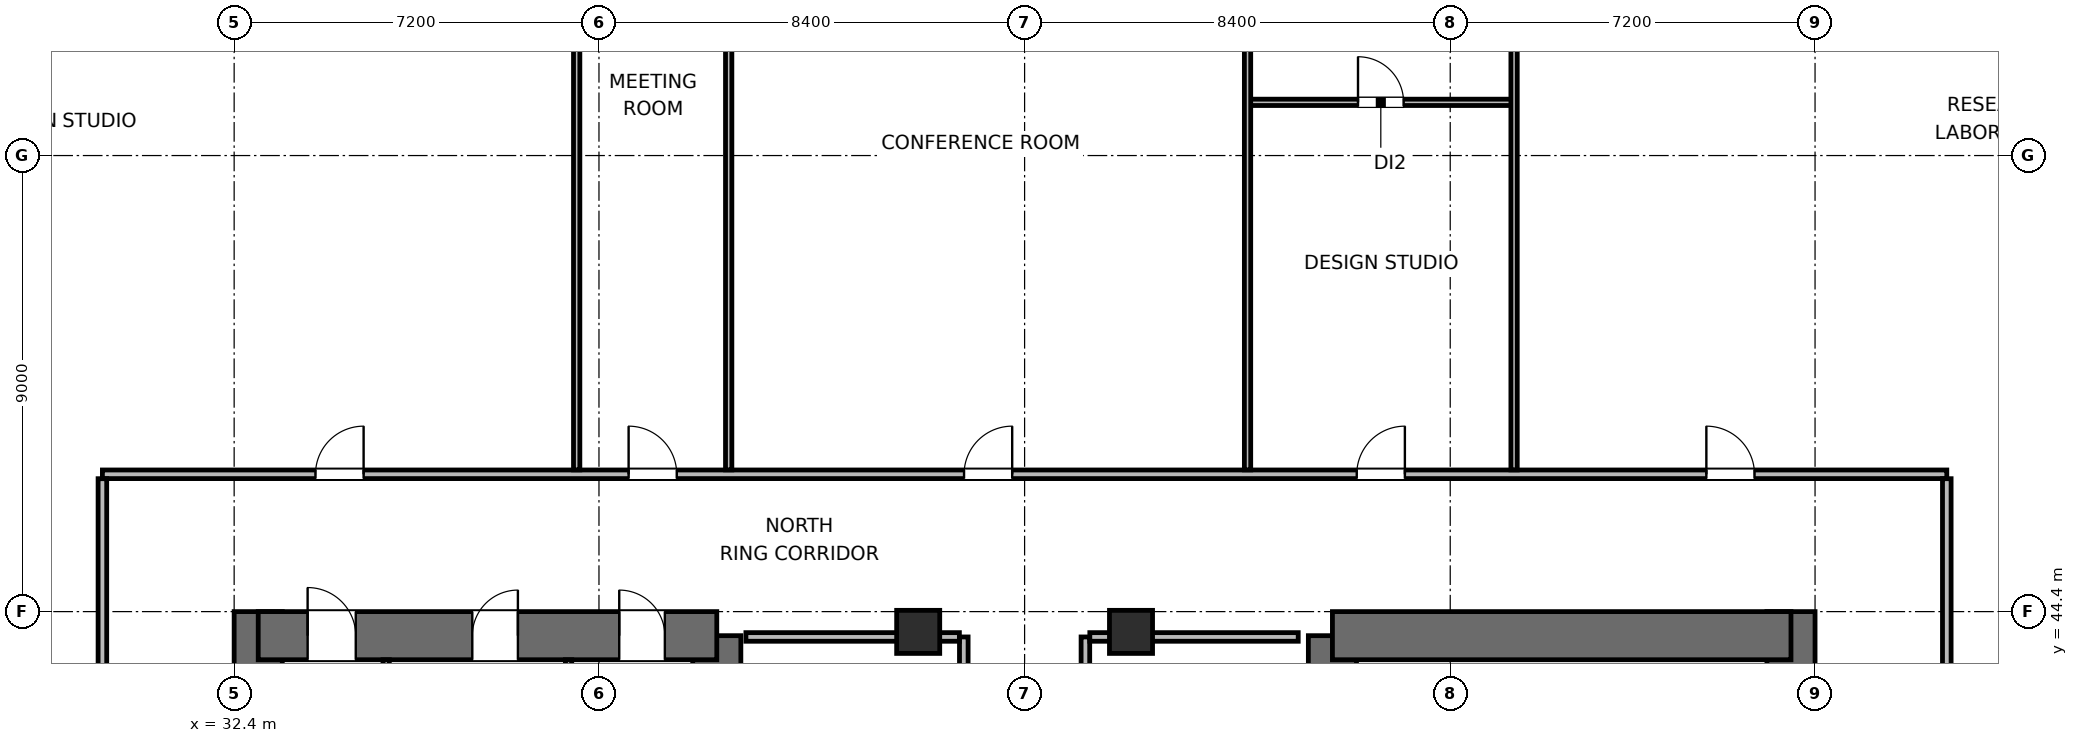
"""IFC4 building model, lengths in metres.
Left out: names, types, materials, properties, quantities, classifications, styles, units other than length and angle.
Written with IfcOpenShell. Run it as: python <this file> out.ifc"""

import sys

from ifc_helpers import new_model, si_unit, direction, frame, frame_2d, origin, origin_2d, place, context, subcontext, project, spatial, rectangle, extrude, element, fill, save


model = new_model("IFC4")
c1 = context("Model", 3, precision=1e-05, world=origin(), true_north=direction((0.0, 1.0)))
c2 = subcontext(c1, "Body", "Model", "MODEL_VIEW")
j1 = project(units=[si_unit("LENGTHUNIT", "METRE"), si_unit("PLANEANGLEUNIT", "RADIAN")], contexts=[c1])
p1 = place(None, origin())
s1 = spatial("IfcSite", under=j1, at=p1, CompositionType="ELEMENT")
p2 = place(p1, origin())
s2 = spatial("IfcBuilding", under=s1, at=p2, CompositionType="ELEMENT")
p3 = place(p2, frame((0.0, 0.0, 52.8)))
s3 = spatial("IfcBuildingStorey", under=s2, at=p3, CompositionType="ELEMENT", Elevation=52.8)
p4 = place(p3, frame((32.875, 27.6, 0.0), z_axis=(0.0, 0.0, 1.0), x_axis=(0.0, 1.0, 0.0)))
e1 = element("IfcWall", 1, at=p4, inside=s3, PredefinedType="SHEAR", context=c2, shape_type="SweptSolid", body=[
    extrude(rectangle(XDim=16.8, YDim=0.95, at=frame_2d((8.4, 0.0))), origin(), (0.0, 0.0, 1.0), 3.9),
])
p5 = place(p3, frame((41.925, 37.8, 0.0), z_axis=(0.0, 0.0, 1.0), x_axis=(0.0, 1.0, 0.0)))
e2 = element("IfcWall", 2, at=p5, inside=s3, PredefinedType="SHEAR", context=c2, shape_type="SweptSolid", body=[
    extrude(rectangle(XDim=6.125, YDim=0.95, at=frame_2d((3.062, 0.0))), origin(), (0.0, 0.0, 1.0), 3.9),
])
p6 = place(p3, frame((32.875, 43.925, 0.0), z_axis=(0.0, 0.0, 1.0), x_axis=(1.0, 0.0, 0.0)))
e3 = element("IfcWall", 3, at=p6, inside=s3, PredefinedType="SHEAR", context=c2, shape_type="SweptSolid", body=[
    extrude(rectangle(XDim=9.05, YDim=0.95, at=frame_2d((4.525, 0.0))), origin(), (0.0, 0.0, 1.0), 3.9),
])
p7 = place(p6, frame((0.975, 0.0, 0.0)))
e4 = element("IfcOpeningElement", 4, at=p7, cuts=e3, PredefinedType="OPENING", context=c2, shape_type="SweptSolid", body=[
    extrude(rectangle(XDim=0.95, YDim=2.04, at=frame_2d((0.475, 1.02))), frame((0.0, 0.485, 0.0), z_axis=(0.0, -1.0, 0.0), x_axis=(1.0, 0.0, 0.0)), (0.0, 0.0, 1.0), 0.97),
])
p8 = place(p6, frame((4.225, 0.0, 0.0)))
e5 = element("IfcOpeningElement", 5, at=p8, cuts=e3, PredefinedType="OPENING", context=c2, shape_type="SweptSolid", body=[
    extrude(rectangle(XDim=0.9, YDim=2.02, at=frame_2d((0.45, 1.01))), frame((0.0, 0.485, 0.0), z_axis=(0.0, -1.0, 0.0), x_axis=(1.0, 0.0, 0.0)), (0.0, 0.0, 1.0), 0.97),
])
p9 = place(p6, frame((7.125, 0.0, 0.0)))
e6 = element("IfcOpeningElement", 6, at=p9, cuts=e3, PredefinedType="OPENING", context=c2, shape_type="SweptSolid", body=[
    extrude(rectangle(XDim=0.9, YDim=2.02, at=frame_2d((0.45, 1.01))), frame((0.0, 0.485, 0.0), z_axis=(0.0, -1.0, 0.0), x_axis=(1.0, 0.0, 0.0)), (0.0, 0.0, 1.0), 0.97),
])
p10 = place(p3, frame((54.075, 38.0, 0.0), z_axis=(0.0, 0.0, 1.0), x_axis=(0.0, 1.0, 0.0)))
e7 = element("IfcWall", 7, at=p10, inside=s3, PredefinedType="SHEAR", context=c2, shape_type="SweptSolid", body=[
    extrude(rectangle(XDim=5.925, YDim=0.95, at=frame_2d((2.962, 0.0))), origin(), (0.0, 0.0, 1.0), 3.9),
])
p11 = place(p3, frame((63.125, 27.6, 0.0), z_axis=(0.0, 0.0, 1.0), x_axis=(0.0, 1.0, 0.0)))
e8 = element("IfcWall", 8, at=p11, inside=s3, PredefinedType="SHEAR", context=c2, shape_type="SweptSolid", body=[
    extrude(rectangle(XDim=16.8, YDim=0.95, at=frame_2d((8.4, 0.0))), origin(), (0.0, 0.0, 1.0), 3.9),
])
p12 = place(p3, frame((54.075, 43.925, 0.0), z_axis=(0.0, 0.0, 1.0), x_axis=(1.0, 0.0, 0.0)))
e9 = element("IfcWall", 9, at=p12, inside=s3, PredefinedType="SHEAR", context=c2, shape_type="SweptSolid", body=[
    extrude(rectangle(XDim=9.05, YDim=0.95, at=frame_2d((4.525, 0.0))), origin(), (0.0, 0.0, 1.0), 3.9),
])
for number, where, z_axis, x_axis in (
    (10, (45.9, 44.0, 0.0), (0.0, 0.0, 1.0), (1.0, 0.0, 0.0)),
    (11, (50.1, 44.0, 0.0), (0.0, 0.0, 1.0), (1.0, 0.0, 0.0)),
):
    element("IfcColumn", number, at=place(p3, frame(where, z_axis=z_axis, x_axis=x_axis)), inside=s3, PredefinedType="COLUMN", context=c2, shape_type="SweptSolid", body=[
        extrude(rectangle(XDim=0.85, YDim=0.85, at=origin_2d()), origin(), (0.0, 0.0, 1.0), 3.9),
    ])
for number, where, z_axis, x_axis in (
    (12, (35.4, 41.095, 0.0), (0.0, 0.0, 1.0), (0.0, 1.0, 0.0)),
    (13, (39.0, 41.095, 0.0), (0.0, 0.0, 1.0), (0.0, 1.0, 0.0)),
):
    element("IfcWall", number, at=place(p3, frame(where, z_axis=z_axis, x_axis=x_axis)), inside=s3, PredefinedType="PARTITIONING", context=c2, shape_type="SweptSolid", body=[
        extrude(rectangle(XDim=2.355, YDim=0.125, at=frame_2d((1.177, 0.0))), origin(), (0.0, 0.0, 1.0), 3.64),
    ])
p13 = place(p3, frame((46.8, 37.9, 0.0), z_axis=(0.0, 0.0, 1.0), x_axis=(0.0, 1.0, 0.0)))
e14 = element("IfcWall", 14, at=p13, inside=s3, PredefinedType="PARTITIONING", context=c2, shape_type="SweptSolid", body=[
    extrude(rectangle(XDim=6.0, YDim=0.17, at=frame_2d((3.0, 0.0))), origin(), (0.0, 0.0, 1.0), 3.64),
])
p14 = place(p13, frame((2.55, 0.0, 0.0)))
e15 = element("IfcOpeningElement", 15, at=p14, cuts=e14, PredefinedType="OPENING", context=c2, shape_type="SweptSolid", body=[
    extrude(rectangle(XDim=0.9, YDim=2.02, at=frame_2d((0.45, 1.01))), frame((0.0, 0.095, 0.0), z_axis=(0.0, -1.0, 0.0), x_axis=(1.0, 0.0, 0.0)), (0.0, 0.0, 1.0), 0.19),
])
p15 = place(p3, frame((42.5, 43.9, 0.0), z_axis=(0.0, 0.0, 1.0), x_axis=(1.0, 0.0, 0.0)))
e16 = element("IfcWall", 16, at=p15, inside=s3, PredefinedType="PARTITIONING", context=c2, shape_type="SweptSolid", body=[
    extrude(rectangle(XDim=4.213, YDim=0.17, at=frame_2d((2.106, 0.0))), origin(), (0.0, 0.0, 1.0), 2.525),
])
p16 = place(p3, frame((49.2, 37.9, 0.0), z_axis=(0.0, 0.0, 1.0), x_axis=(0.0, 1.0, 0.0)))
e17 = element("IfcWall", 17, at=p16, inside=s3, PredefinedType="PARTITIONING", context=c2, shape_type="SweptSolid", body=[
    extrude(rectangle(XDim=6.0, YDim=0.17, at=frame_2d((3.0, 0.0))), origin(), (0.0, 0.0, 1.0), 3.64),
])
p17 = place(p16, frame((1.47, 0.0, 0.0)))
e18 = element("IfcOpeningElement", 18, at=p17, cuts=e17, PredefinedType="OPENING", context=c2, shape_type="SweptSolid", body=[
    extrude(rectangle(XDim=0.9, YDim=2.02, at=frame_2d((0.45, 1.01))), frame((0.0, 0.095, 0.0), z_axis=(0.0, -1.0, 0.0), x_axis=(1.0, 0.0, 0.0)), (0.0, 0.0, 1.0), 0.19),
])
p18 = place(p16, frame((4.47, 0.0, 0.0)))
e19 = element("IfcOpeningElement", 19, at=p18, cuts=e17, PredefinedType="OPENING", context=c2, shape_type="SweptSolid", body=[
    extrude(rectangle(XDim=0.9, YDim=2.02, at=frame_2d((0.45, 1.01))), frame((0.0, 0.095, 0.0), z_axis=(0.0, -1.0, 0.0), x_axis=(1.0, 0.0, 0.0)), (0.0, 0.0, 1.0), 0.19),
])
p19 = place(p3, frame((49.287, 43.9, 0.0), z_axis=(0.0, 0.0, 1.0), x_axis=(1.0, 0.0, 0.0)))
e20 = element("IfcWall", 20, at=p19, inside=s3, PredefinedType="PARTITIONING", context=c2, shape_type="SweptSolid", body=[
    extrude(rectangle(XDim=4.113, YDim=0.17, at=frame_2d((2.056, 0.0))), origin(), (0.0, 0.0, 1.0), 2.525),
])
p20 = place(p3, frame((29.8, 47.11, 0.0), z_axis=(0.0, 0.0, 1.0), x_axis=(1.0, 0.0, 0.0)))
e21 = element("IfcWall", 21, at=p20, inside=s3, PredefinedType="PARTITIONING", context=c2, shape_type="SweptSolid", body=[
    extrude(rectangle(XDim=36.4, YDim=0.17, at=frame_2d((18.2, 0.0))), origin(), (0.0, 0.0, 1.0), 3.64),
])
p21 = place(p20, frame((4.205, 0.0, 0.0)))
e22 = element("IfcOpeningElement", 22, at=p21, cuts=e21, PredefinedType="OPENING", context=c2, shape_type="SweptSolid", body=[
    extrude(rectangle(XDim=0.95, YDim=2.04, at=frame_2d((0.475, 1.02))), frame((0.0, 0.095, 0.0), z_axis=(0.0, -1.0, 0.0), x_axis=(1.0, 0.0, 0.0)), (0.0, 0.0, 1.0), 0.19),
])
p22 = place(p20, frame((10.385, 0.0, 0.0)))
e23 = element("IfcOpeningElement", 23, at=p22, cuts=e21, PredefinedType="OPENING", context=c2, shape_type="SweptSolid", body=[
    extrude(rectangle(XDim=0.95, YDim=2.04, at=frame_2d((0.475, 1.02))), frame((0.0, 0.095, 0.0), z_axis=(0.0, -1.0, 0.0), x_axis=(1.0, 0.0, 0.0)), (0.0, 0.0, 1.0), 0.19),
])
p23 = place(p20, frame((17.005, 0.0, 0.0)))
e24 = element("IfcOpeningElement", 24, at=p23, cuts=e21, PredefinedType="OPENING", context=c2, shape_type="SweptSolid", body=[
    extrude(rectangle(XDim=0.95, YDim=2.04, at=frame_2d((0.475, 1.02))), frame((0.0, 0.095, 0.0), z_axis=(0.0, -1.0, 0.0), x_axis=(1.0, 0.0, 0.0)), (0.0, 0.0, 1.0), 0.19),
])
p24 = place(p20, frame((24.755, 0.0, 0.0)))
e25 = element("IfcOpeningElement", 25, at=p24, cuts=e21, PredefinedType="OPENING", context=c2, shape_type="SweptSolid", body=[
    extrude(rectangle(XDim=0.95, YDim=2.04, at=frame_2d((0.475, 1.02))), frame((0.0, 0.095, 0.0), z_axis=(0.0, -1.0, 0.0), x_axis=(1.0, 0.0, 0.0)), (0.0, 0.0, 1.0), 0.19),
])
p25 = place(p20, frame((31.655, 0.0, 0.0)))
e26 = element("IfcOpeningElement", 26, at=p25, cuts=e21, PredefinedType="OPENING", context=c2, shape_type="SweptSolid", body=[
    extrude(rectangle(XDim=0.95, YDim=2.04, at=frame_2d((0.475, 1.02))), frame((0.0, 0.095, 0.0), z_axis=(0.0, -1.0, 0.0), x_axis=(1.0, 0.0, 0.0)), (0.0, 0.0, 1.0), 0.19),
])
p26 = place(p3, frame((29.8, 24.977, 0.0), z_axis=(0.0, 0.0, 1.0), x_axis=(0.0, 1.0, 0.0)))
e27 = element("IfcWall", 27, at=p26, inside=s3, PredefinedType="PARTITIONING", context=c2, shape_type="SweptSolid", body=[
    extrude(rectangle(XDim=22.046, YDim=0.17, at=frame_2d((11.023, 0.0))), origin(), (0.0, 0.0, 1.0), 3.64),
])
p27 = place(p26, frame((10.548, 0.0, 0.0)))
e28 = element("IfcOpeningElement", 28, at=p27, cuts=e27, PredefinedType="OPENING", context=c2, shape_type="SweptSolid", body=[
    extrude(rectangle(XDim=0.95, YDim=2.04, at=frame_2d((0.475, 1.02))), frame((0.0, 0.095, 0.0), z_axis=(0.0, -1.0, 0.0), x_axis=(1.0, 0.0, 0.0)), (0.0, 0.0, 1.0), 0.19),
])
p28 = place(p3, frame((66.2, 24.977, 0.0), z_axis=(0.0, 0.0, 1.0), x_axis=(0.0, 1.0, 0.0)))
e29 = element("IfcWall", 29, at=p28, inside=s3, PredefinedType="PARTITIONING", context=c2, shape_type="SweptSolid", body=[
    extrude(rectangle(XDim=22.046, YDim=0.17, at=frame_2d((11.023, 0.0))), origin(), (0.0, 0.0, 1.0), 3.64),
])
p29 = place(p28, frame((4.493, 0.0, 0.0)))
e30 = element("IfcOpeningElement", 30, at=p29, cuts=e29, PredefinedType="OPENING", context=c2, shape_type="SweptSolid", body=[
    extrude(rectangle(XDim=0.95, YDim=2.04, at=frame_2d((0.475, 1.02))), frame((0.0, 0.095, 0.0), z_axis=(0.0, -1.0, 0.0), x_axis=(1.0, 0.0, 0.0)), (0.0, 0.0, 1.0), 0.19),
])
p30 = place(p28, frame((15.603, 0.0, 0.0)))
e31 = element("IfcOpeningElement", 31, at=p30, cuts=e29, PredefinedType="OPENING", context=c2, shape_type="SweptSolid", body=[
    extrude(rectangle(XDim=0.95, YDim=2.04, at=frame_2d((0.475, 1.02))), frame((0.0, 0.095, 0.0), z_axis=(0.0, -1.0, 0.0), x_axis=(1.0, 0.0, 0.0)), (0.0, 0.0, 1.0), 0.19),
])
p31 = place(p3, frame((39.16, 47.197, 0.0), z_axis=(0.0, 0.0, 1.0), x_axis=(0.0, 1.0, 0.0)))
e32 = element("IfcWall", 32, at=p31, inside=s3, PredefinedType="PARTITIONING", context=c2, shape_type="SweptSolid", body=[
    extrude(rectangle(XDim=14.958, YDim=0.125, at=frame_2d((7.479, 0.0))), origin(), (0.0, 0.0, 1.0), 3.64),
])
p32 = place(p3, frame((42.16, 47.197, 0.0), z_axis=(0.0, 0.0, 1.0), x_axis=(0.0, 1.0, 0.0)))
e33 = element("IfcWall", 33, at=p32, inside=s3, PredefinedType="PARTITIONING", context=c2, shape_type="SweptSolid", body=[
    extrude(rectangle(XDim=14.393, YDim=0.125, at=frame_2d((7.197, 0.0))), origin(), (0.0, 0.0, 1.0), 3.003),
])
p33 = place(p3, frame((52.4, 54.45, 0.0), z_axis=(0.0, 0.0, 1.0), x_axis=(1.0, 0.0, 0.0)))
e34 = element("IfcWall", 34, at=p33, inside=s3, PredefinedType="PARTITIONING", context=c2, shape_type="SweptSolid", body=[
    extrude(rectangle(XDim=5.26, YDim=0.125, at=frame_2d((2.63, 0.0))), origin(), (0.0, 0.0, 1.0), 3.64),
])
p34 = place(p33, frame((2.18, 0.0, 0.0)))
e35 = element("IfcOpeningElement", 35, at=p34, cuts=e34, PredefinedType="OPENING", context=c2, shape_type="SweptSolid", body=[
    extrude(rectangle(XDim=0.9, YDim=2.02, at=frame_2d((0.45, 1.01))), frame((0.0, 0.073, 0.0), z_axis=(0.0, -1.0, 0.0), x_axis=(1.0, 0.0, 0.0)), (0.0, 0.0, 1.0), 0.145),
])
p35 = place(p3, frame((52.4, 47.197, 0.0), z_axis=(0.0, 0.0, 1.0), x_axis=(0.0, 1.0, 0.0)))
e36 = element("IfcWall", 36, at=p35, inside=s3, PredefinedType="PARTITIONING", context=c2, shape_type="SweptSolid", body=[
    extrude(rectangle(XDim=11.228, YDim=0.125, at=frame_2d((5.614, 0.0))), origin(), (0.0, 0.0, 1.0), 3.003),
])
p36 = place(p3, frame((57.66, 47.197, 0.0), z_axis=(0.0, 0.0, 1.0), x_axis=(0.0, 1.0, 0.0)))
e37 = element("IfcWall", 37, at=p36, inside=s3, PredefinedType="PARTITIONING", context=c2, shape_type="SweptSolid", body=[
    extrude(rectangle(XDim=14.888, YDim=0.125, at=frame_2d((7.444, 0.0))), origin(), (0.0, 0.0, 1.0), 3.64),
])
p37 = place(p7, origin())
e38 = element("IfcDoor", 38, at=p37, inside=s3, OperationType="SINGLE_SWING_LEFT", PredefinedType="DOOR", context=c2, shape_type="SweptSolid", body=[
    extrude(rectangle(XDim=0.95, YDim=2.04, at=frame_2d((0.475, 1.02))), frame((0.0, 0.025, 0.0), z_axis=(0.0, -1.0, 0.0), x_axis=(1.0, 0.0, 0.0)), (0.0, 0.0, 1.0), 0.05),
])
fill(e4, e38)
p38 = place(p8, origin())
e39 = element("IfcDoor", 39, at=p38, inside=s3, OperationType="SINGLE_SWING_RIGHT", PredefinedType="DOOR", context=c2, shape_type="SweptSolid", body=[
    extrude(rectangle(XDim=0.9, YDim=2.02, at=frame_2d((0.45, 1.01))), frame((0.0, 0.025, 0.0), z_axis=(0.0, -1.0, 0.0), x_axis=(1.0, 0.0, 0.0)), (0.0, 0.0, 1.0), 0.05),
])
fill(e5, e39)
p39 = place(p9, origin())
e40 = element("IfcDoor", 40, at=p39, inside=s3, OperationType="SINGLE_SWING_LEFT", PredefinedType="DOOR", context=c2, shape_type="SweptSolid", body=[
    extrude(rectangle(XDim=0.9, YDim=2.02, at=frame_2d((0.45, 1.01))), frame((0.0, 0.025, 0.0), z_axis=(0.0, -1.0, 0.0), x_axis=(1.0, 0.0, 0.0)), (0.0, 0.0, 1.0), 0.05),
])
fill(e6, e40)
p40 = place(p21, origin())
e41 = element("IfcDoor", 41, at=p40, inside=s3, OperationType="SINGLE_SWING_RIGHT", PredefinedType="DOOR", context=c2, shape_type="SweptSolid", body=[
    extrude(rectangle(XDim=0.95, YDim=2.04, at=frame_2d((0.475, 1.02))), frame((0.0, 0.025, 0.0), z_axis=(0.0, -1.0, 0.0), x_axis=(1.0, 0.0, 0.0)), (0.0, 0.0, 1.0), 0.05),
])
fill(e22, e41)
p41 = place(p22, origin())
e42 = element("IfcDoor", 42, at=p41, inside=s3, OperationType="SINGLE_SWING_LEFT", PredefinedType="DOOR", context=c2, shape_type="SweptSolid", body=[
    extrude(rectangle(XDim=0.95, YDim=2.04, at=frame_2d((0.475, 1.02))), frame((0.0, 0.025, 0.0), z_axis=(0.0, -1.0, 0.0), x_axis=(1.0, 0.0, 0.0)), (0.0, 0.0, 1.0), 0.05),
])
fill(e23, e42)
p42 = place(p23, origin())
e43 = element("IfcDoor", 43, at=p42, inside=s3, OperationType="SINGLE_SWING_RIGHT", PredefinedType="DOOR", context=c2, shape_type="SweptSolid", body=[
    extrude(rectangle(XDim=0.95, YDim=2.04, at=frame_2d((0.475, 1.02))), frame((0.0, 0.025, 0.0), z_axis=(0.0, -1.0, 0.0), x_axis=(1.0, 0.0, 0.0)), (0.0, 0.0, 1.0), 0.05),
])
fill(e24, e43)
p43 = place(p34, origin())
e44 = element("IfcDoor", 44, at=p43, inside=s3, OperationType="SINGLE_SWING_LEFT", PredefinedType="DOOR", context=c2, shape_type="SweptSolid", body=[
    extrude(rectangle(XDim=0.9, YDim=2.02, at=frame_2d((0.45, 1.01))), frame((0.0, 0.025, 0.0), z_axis=(0.0, -1.0, 0.0), x_axis=(1.0, 0.0, 0.0)), (0.0, 0.0, 1.0), 0.05),
])
fill(e35, e44)
p44 = place(p24, origin())
e45 = element("IfcDoor", 45, at=p44, inside=s3, OperationType="SINGLE_SWING_RIGHT", PredefinedType="DOOR", context=c2, shape_type="SweptSolid", body=[
    extrude(rectangle(XDim=0.95, YDim=2.04, at=frame_2d((0.475, 1.02))), frame((0.0, 0.025, 0.0), z_axis=(0.0, -1.0, 0.0), x_axis=(1.0, 0.0, 0.0)), (0.0, 0.0, 1.0), 0.05),
])
fill(e25, e45)
p45 = place(p25, origin())
e46 = element("IfcDoor", 46, at=p45, inside=s3, OperationType="SINGLE_SWING_LEFT", PredefinedType="DOOR", context=c2, shape_type="SweptSolid", body=[
    extrude(rectangle(XDim=0.95, YDim=2.04, at=frame_2d((0.475, 1.02))), frame((0.0, 0.025, 0.0), z_axis=(0.0, -1.0, 0.0), x_axis=(1.0, 0.0, 0.0)), (0.0, 0.0, 1.0), 0.05),
])
fill(e26, e46)
save(model, sys.argv[1])
